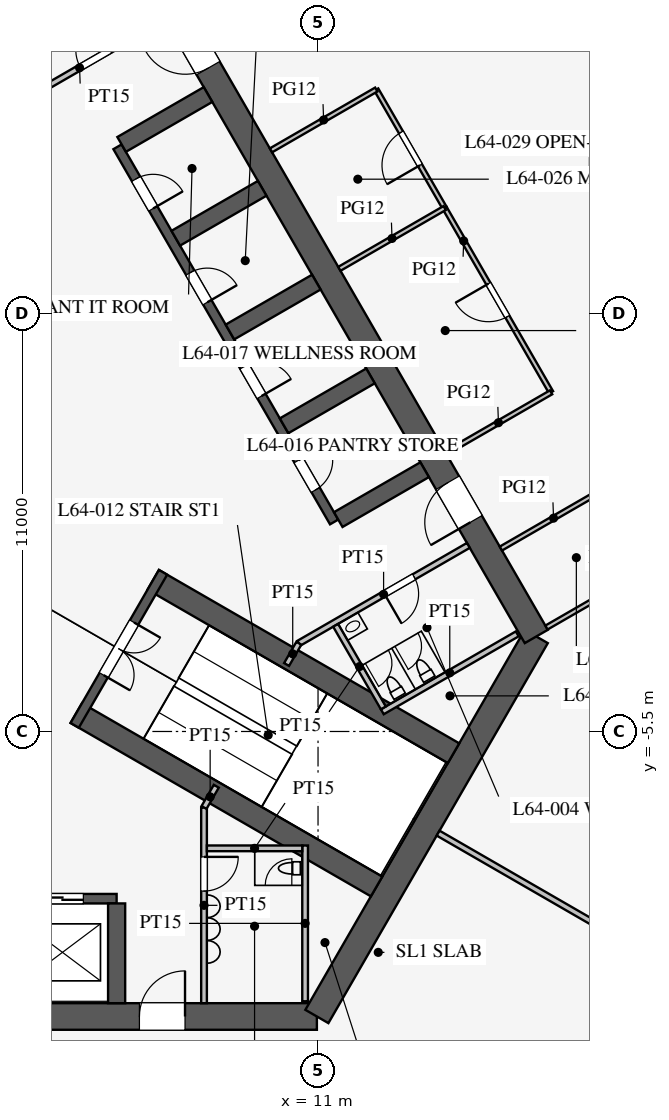
"""IFC4 building model, lengths in metres.
Left out: names, types, materials, properties, quantities, classifications, styles, units other than length and angle.
Written with IfcOpenShell. Run it as: python <this file> out.ifc"""

import sys

from ifc_helpers import new_model, si_unit, direction, frame, frame_2d, origin, place, context, subcontext, project, spatial, rectangle, extrude, element, fill, save


model = new_model("IFC4")
c1 = context("Model", 3, precision=1e-05, world=origin(), true_north=direction((0.0, 1.0)))
c2 = subcontext(c1, "Body", "Model", "MODEL_VIEW")
j1 = project(units=[si_unit("LENGTHUNIT", "METRE"), si_unit("PLANEANGLEUNIT", "RADIAN")], contexts=[c1])
p1 = place(None, origin())
s1 = spatial("IfcSite", under=j1, at=p1, CompositionType="ELEMENT")
p2 = place(p1, origin())
s2 = spatial("IfcBuilding", under=s1, at=p2, CompositionType="ELEMENT")
p3 = place(p2, frame((0.0, 0.0, 280.5)))
s3 = spatial("IfcBuildingStorey", under=s2, at=p3, CompositionType="ELEMENT", Elevation=280.5)
p4 = place(p3, frame((-10.97, -13.0, 0.0), z_axis=(0.0, 0.0, 1.0), x_axis=(1.0, 0.0, 0.0)))
e1 = element("IfcWall", 1, at=p4, inside=s3, PredefinedType="SHEAR", context=c2, shape_type="SweptSolid", body=[
    extrude(rectangle(XDim=21.939, YDim=0.7, at=frame_2d((10.97, 0.0))), origin(), (0.0, 0.0, 1.0), 4.2),
])
p5 = place(p4, frame((17.27, 0.0, 0.0)))
e2 = element("IfcOpeningElement", 2, at=p5, cuts=e1, PredefinedType="OPENING", context=c2, shape_type="SweptSolid", body=[
    extrude(rectangle(XDim=1.2, YDim=2.1, at=frame_2d((0.6, 1.05))), frame((0.0, 0.36, 0.0), z_axis=(0.0, -1.0, 0.0), x_axis=(1.0, 0.0, 0.0)), (0.0, 0.0, 1.0), 0.72),
])
p6 = place(p4, frame((3.47, 0.0, 0.0)))
e3 = element("IfcOpeningElement", 3, at=p6, cuts=e1, PredefinedType="OPENING", context=c2, shape_type="SweptSolid", body=[
    extrude(rectangle(XDim=1.2, YDim=2.1, at=frame_2d((0.6, 1.05))), frame((0.0, 0.36, 0.0), z_axis=(0.0, -1.0, 0.0), x_axis=(1.0, 0.0, 0.0)), (0.0, 0.0, 1.0), 0.72),
])
p7 = place(p3, frame((10.97, -13.0, 0.0), z_axis=(0.0, 0.0, 1.0), x_axis=(0.499995765644, 0.866027848477, 0.0)))
e4 = element("IfcWall", 4, at=p7, inside=s3, PredefinedType="SHEAR", context=c2, shape_type="SweptSolid", body=[
    extrude(rectangle(XDim=11.547, YDim=0.7, at=frame_2d((5.773, 0.0))), origin(), (0.0, 0.0, 1.0), 4.2),
])
p8 = place(p3, frame((16.743, -3.0, 0.0), z_axis=(0.0, 0.0, 1.0), x_axis=(-0.500002442456, 0.866023993627, 0.0)))
e5 = element("IfcWall", 5, at=p8, inside=s3, PredefinedType="SHEAR", context=c2, shape_type="SweptSolid", body=[
    extrude(rectangle(XDim=21.939, YDim=0.7, at=frame_2d((10.97, 0.0))), origin(), (0.0, 0.0, 1.0), 4.2),
])
p9 = place(p8, frame((17.27, 0.0, 0.0)))
e6 = element("IfcOpeningElement", 6, at=p9, cuts=e5, PredefinedType="OPENING", context=c2, shape_type="SweptSolid", body=[
    extrude(rectangle(XDim=1.2, YDim=2.1, at=frame_2d((0.6, 1.05))), frame((0.0, 0.36, 0.0), z_axis=(0.0, -1.0, 0.0), x_axis=(1.0, 0.0, 0.0)), (0.0, 0.0, 1.0), 0.72),
])
p10 = place(p8, frame((3.47, 0.0, 0.0)))
e7 = element("IfcOpeningElement", 7, at=p10, cuts=e5, PredefinedType="OPENING", context=c2, shape_type="SweptSolid", body=[
    extrude(rectangle(XDim=1.2, YDim=2.1, at=frame_2d((0.6, 1.05))), frame((0.0, 0.36, 0.0), z_axis=(0.0, -1.0, 0.0), x_axis=(1.0, 0.0, 0.0)), (0.0, 0.0, 1.0), 0.72),
])
p11 = place(p3, frame((-5.7, -9.9, 0.0), z_axis=(0.0, 0.0, 1.0), x_axis=(1.0, 0.0, 0.0)))
e8 = element("IfcWall", 8, at=p11, inside=s3, PredefinedType="SHEAR", context=c2, shape_type="SweptSolid", body=[
    extrude(rectangle(XDim=11.4, YDim=0.25, at=frame_2d((5.7, 0.0))), origin(), (0.0, 0.0, 1.0), 4.2),
])
p12 = place(p11, frame((0.875, 0.0, 0.0)))
e9 = element("IfcOpeningElement", 9, at=p12, cuts=e8, PredefinedType="OPENING", context=c2, shape_type="SweptSolid", body=[
    extrude(rectangle(XDim=1.1, YDim=2.2, at=frame_2d((0.55, 1.1))), frame((0.0, 0.135, 0.0), z_axis=(0.0, -1.0, 0.0), x_axis=(1.0, 0.0, 0.0)), (0.0, 0.0, 1.0), 0.27),
])
p13 = place(p11, frame((3.725, 0.0, 0.0)))
e10 = element("IfcOpeningElement", 10, at=p13, cuts=e8, PredefinedType="OPENING", context=c2, shape_type="SweptSolid", body=[
    extrude(rectangle(XDim=1.1, YDim=2.2, at=frame_2d((0.55, 1.1))), frame((0.0, 0.135, 0.0), z_axis=(0.0, -1.0, 0.0), x_axis=(1.0, 0.0, 0.0)), (0.0, 0.0, 1.0), 0.27),
])
p14 = place(p11, frame((6.575, 0.0, 0.0)))
e11 = element("IfcOpeningElement", 11, at=p14, cuts=e8, PredefinedType="OPENING", context=c2, shape_type="SweptSolid", body=[
    extrude(rectangle(XDim=1.1, YDim=2.2, at=frame_2d((0.55, 1.1))), frame((0.0, 0.135, 0.0), z_axis=(0.0, -1.0, 0.0), x_axis=(1.0, 0.0, 0.0)), (0.0, 0.0, 1.0), 0.27),
])
p15 = place(p11, frame((9.425, 0.0, 0.0)))
e12 = element("IfcOpeningElement", 12, at=p15, cuts=e8, PredefinedType="OPENING", context=c2, shape_type="SweptSolid", body=[
    extrude(rectangle(XDim=1.1, YDim=2.2, at=frame_2d((0.55, 1.1))), frame((0.0, 0.135, 0.0), z_axis=(0.0, -1.0, 0.0), x_axis=(1.0, 0.0, 0.0)), (0.0, 0.0, 1.0), 0.27),
])
p16 = place(p3, frame((5.7, -10.025, 0.0), z_axis=(0.0, 0.0, 1.0), x_axis=(0.0, -1.0, 0.0)))
e13 = element("IfcWall", 13, at=p16, inside=s3, PredefinedType="SHEAR", context=c2, shape_type="SweptSolid", body=[
    extrude(rectangle(XDim=2.625, YDim=0.45, at=frame_2d((1.312, 0.0))), origin(), (0.0, 0.0, 1.0), 4.2),
])
p17 = place(p3, frame((11.424, 0.014, 0.0), z_axis=(0.0, 0.0, 1.0), x_axis=(-0.500001763848, 0.866024385424, 0.0)))
e14 = element("IfcWall", 14, at=p17, inside=s3, PredefinedType="SHEAR", context=c2, shape_type="SweptSolid", body=[
    extrude(rectangle(XDim=11.4, YDim=0.25, at=frame_2d((5.7, 0.0))), origin(), (0.0, 0.0, 1.0), 4.2),
])
p18 = place(p17, frame((0.975, 0.0, 0.0)))
e15 = element("IfcOpeningElement", 15, at=p18, cuts=e14, PredefinedType="OPENING", context=c2, shape_type="SweptSolid", body=[
    extrude(rectangle(XDim=0.9, YDim=2.1, at=frame_2d((0.45, 1.05))), frame((0.0, 0.135, 0.0), z_axis=(0.0, -1.0, 0.0), x_axis=(1.0, 0.0, 0.0)), (0.0, 0.0, 1.0), 0.27),
])
p19 = place(p17, frame((3.825, 0.0, 0.0)))
e16 = element("IfcOpeningElement", 16, at=p19, cuts=e14, PredefinedType="OPENING", context=c2, shape_type="SweptSolid", body=[
    extrude(rectangle(XDim=0.9, YDim=2.1, at=frame_2d((0.45, 1.05))), frame((0.0, 0.135, 0.0), z_axis=(0.0, -1.0, 0.0), x_axis=(1.0, 0.0, 0.0)), (0.0, 0.0, 1.0), 0.27),
])
p20 = place(p17, frame((6.675, 0.0, 0.0)))
e17 = element("IfcOpeningElement", 17, at=p20, cuts=e14, PredefinedType="OPENING", context=c2, shape_type="SweptSolid", body=[
    extrude(rectangle(XDim=0.9, YDim=2.1, at=frame_2d((0.45, 1.05))), frame((0.0, 0.135, 0.0), z_axis=(0.0, -1.0, 0.0), x_axis=(1.0, 0.0, 0.0)), (0.0, 0.0, 1.0), 0.27),
])
p21 = place(p17, frame((9.525, 0.0, 0.0)))
e18 = element("IfcOpeningElement", 18, at=p21, cuts=e14, PredefinedType="OPENING", context=c2, shape_type="SweptSolid", body=[
    extrude(rectangle(XDim=0.9, YDim=2.1, at=frame_2d((0.45, 1.05))), frame((0.0, 0.135, 0.0), z_axis=(0.0, -1.0, 0.0), x_axis=(1.0, 0.0, 0.0)), (0.0, 0.0, 1.0), 0.27),
])
for number, where, z_axis, x_axis in (
    (19, (11.532, 0.076, 0.0), (0.0, 0.0, 1.0), (0.866, 0.5, 0.0)),
    (20, (10.107, 2.544, 0.0), (0.0, 0.0, 1.0), (0.866, 0.5, 0.0)),
    (21, (8.682, 5.012, 0.0), (0.0, 0.0, 1.0), (0.866, 0.5, 0.0)),
    (22, (7.257, 7.481, 0.0), (0.0, 0.0, 1.0), (0.866, 0.5, 0.0)),
    (23, (5.832, 9.949, 0.0), (0.0, 0.0, 1.0), (0.866, 0.5, 0.0)),
):
    element("IfcWall", number, at=place(p3, frame(where, z_axis=z_axis, x_axis=x_axis)), inside=s3, PredefinedType="SHEAR", context=c2, shape_type="SweptSolid", body=[
        extrude(rectangle(XDim=2.625, YDim=0.45, at=frame_2d((1.312, 0.0))), origin(), (0.0, 0.0, 1.0), 4.2),
    ])
for number, where, z_axis, x_axis in (
    (24, (4.638, -5.016, 0.0), (0.0, 0.0, 1.0), (0.866, -0.5, 0.0)),
    (25, (6.663, -1.509, 0.0), (0.0, 0.0, 1.0), (0.866, -0.5, 0.0)),
):
    element("IfcWall", number, at=place(p3, frame(where, z_axis=z_axis, x_axis=x_axis)), inside=s3, PredefinedType="SHEAR", context=c2, shape_type="SweptSolid", body=[
        extrude(rectangle(XDim=9.125, YDim=0.6, at=frame_2d((4.562, 0.0))), origin(), (0.0, 0.0, 1.0), 4.2),
    ])
p22 = place(p3, frame((4.597, -5.339, 0.0), z_axis=(0.0, 0.0, 1.0), x_axis=(0.499984536904, 0.866034331223, 0.0)))
e26 = element("IfcWall", 26, at=p22, inside=s3, PredefinedType="SHEAR", context=c2, shape_type="SweptSolid", body=[
    extrude(rectangle(XDim=4.65, YDim=0.25, at=frame_2d((2.325, 0.0))), origin(), (0.0, 0.0, 1.0), 4.2),
])
p23 = place(p22, frame((1.525, 0.0, 0.0)))
e27 = element("IfcOpeningElement", 27, at=p23, cuts=e26, PredefinedType="OPENING", context=c2, shape_type="SweptSolid", body=[
    extrude(rectangle(XDim=1.6, YDim=2.1, at=frame_2d((0.8, 1.05))), frame((0.0, 0.135, 0.0), z_axis=(0.0, -1.0, 0.0), x_axis=(1.0, 0.0, 0.0)), (0.0, 0.0, 1.0), 0.27),
])
p24 = place(p3, frame((8.0, -7.5, 0.0), z_axis=(0.0, 0.0, 1.0), x_axis=(0.0, -1.0, 0.0)))
e28 = element("IfcWall", 28, at=p24, inside=s3, PredefinedType="PARTITIONING", context=c2, shape_type="SweptSolid", body=[
    extrude(rectangle(XDim=5.15, YDim=0.15, at=frame_2d((2.575, 0.0))), origin(), (0.0, 0.0, 1.0), 4.0),
])
p25 = place(p24, frame((1.3, 0.0, 0.0)))
e29 = element("IfcOpeningElement", 29, at=p25, cuts=e28, PredefinedType="OPENING", context=c2, shape_type="SweptSolid", body=[
    extrude(rectangle(XDim=0.9, YDim=2.1, at=frame_2d((0.45, 1.05))), frame((0.0, 0.085, 0.0), z_axis=(0.0, -1.0, 0.0), x_axis=(1.0, 0.0, 0.0)), (0.0, 0.0, 1.0), 0.17),
])
p26 = place(p3, frame((2.495, 10.678, 0.0), z_axis=(0.0, 0.0, 1.0), x_axis=(0.866037967349, 0.499978238636, 0.0)))
e30 = element("IfcWall", 30, at=p26, inside=s3, PredefinedType="PARTITIONING", context=c2, shape_type="SweptSolid", body=[
    extrude(rectangle(XDim=5.15, YDim=0.15, at=frame_2d((2.575, 0.0))), origin(), (0.0, 0.0, 1.0), 4.0),
])
p27 = place(p26, frame((2.6, 0.0, 0.0)))
e31 = element("IfcOpeningElement", 31, at=p27, cuts=e30, PredefinedType="OPENING", context=c2, shape_type="SweptSolid", body=[
    extrude(rectangle(XDim=0.9, YDim=2.1, at=frame_2d((0.45, 1.05))), frame((0.0, 0.085, 0.0), z_axis=(0.0, -1.0, 0.0), x_axis=(1.0, 0.0, 0.0)), (0.0, 0.0, 1.0), 0.17),
])
p28 = place(p3, frame((10.495, -3.178, 0.0), z_axis=(0.0, 0.0, 1.0), x_axis=(0.866037967349, 0.499978238636, 0.0)))
e32 = element("IfcWall", 32, at=p28, inside=s3, PredefinedType="PARTITIONING", context=c2, shape_type="SweptSolid", body=[
    extrude(rectangle(XDim=5.15, YDim=0.15, at=frame_2d((2.575, 0.0))), origin(), (0.0, 0.0, 1.0), 4.0),
])
p29 = place(p28, frame((2.6, 0.0, 0.0)))
e33 = element("IfcOpeningElement", 33, at=p29, cuts=e32, PredefinedType="OPENING", context=c2, shape_type="SweptSolid", body=[
    extrude(rectangle(XDim=0.9, YDim=2.1, at=frame_2d((0.45, 1.05))), frame((0.0, 0.085, 0.0), z_axis=(0.0, -1.0, 0.0), x_axis=(1.0, 0.0, 0.0)), (0.0, 0.0, 1.0), 0.17),
])
for number, where, z_axis, x_axis in (
    (34, (8.0, -7.5, 0.0), (0.0, 0.0, 1.0), (0.5, 0.866, 0.0)),
    (35, (10.495, -3.178, 0.0), (0.0, 0.0, 1.0), (-0.5, -0.866, 0.0)),
):
    element("IfcWall", number, at=place(p3, frame(where, z_axis=z_axis, x_axis=x_axis)), inside=s3, PredefinedType="PARTITIONING", context=c2, shape_type="SweptSolid", body=[
        extrude(rectangle(XDim=0.645, YDim=0.15, at=frame_2d((0.323, 0.0))), origin(), (0.0, 0.0, 1.0), 4.0),
    ])
p30 = place(p3, frame((10.66, -8.5, 0.0), z_axis=(0.0, 0.0, 1.0), x_axis=(0.0, -1.0, 0.0)))
e36 = element("IfcWall", 36, at=p30, inside=s3, PredefinedType="PARTITIONING", context=c2, shape_type="SweptSolid", body=[
    extrude(rectangle(XDim=4.1, YDim=0.15, at=frame_2d((2.05, 0.0))), origin(), (0.0, 0.0, 1.0), 4.0),
])
p31 = place(p3, frame((8.075, -8.575, 0.0), z_axis=(0.0, 0.0, 1.0), x_axis=(1.0, 0.0, 0.0)))
e37 = element("IfcWall", 37, at=p31, inside=s3, PredefinedType="PARTITIONING", context=c2, shape_type="SweptSolid", body=[
    extrude(rectangle(XDim=2.51, YDim=0.15, at=frame_2d((1.255, 0.0))), origin(), (0.0, 0.0, 1.0), 4.0),
])
p32 = place(p3, frame((12.691, -4.982, 0.0), z_axis=(0.0, 0.0, 1.0), x_axis=(0.8660249478, 0.500000789788, 0.0)))
e38 = element("IfcWall", 38, at=p32, inside=s3, PredefinedType="PARTITIONING", context=c2, shape_type="SweptSolid", body=[
    extrude(rectangle(XDim=4.1, YDim=0.15, at=frame_2d((2.05, 0.0))), origin(), (0.0, 0.0, 1.0), 4.0),
])
p33 = place(p3, frame((11.464, -2.706, 0.0), z_axis=(0.0, 0.0, 1.0), x_axis=(0.50001992892, -0.866013897511, 0.0)))
e39 = element("IfcWall", 39, at=p33, inside=s3, PredefinedType="PARTITIONING", context=c2, shape_type="SweptSolid", body=[
    extrude(rectangle(XDim=2.51, YDim=0.15, at=frame_2d((1.255, 0.0))), origin(), (0.0, 0.0, 1.0), 4.0),
])
p34 = place(p3, frame((14.159, -8.175, 0.0), z_axis=(0.0, 0.0, 1.0), x_axis=(0.866026905467, -0.499997399001, 0.0)))
e40 = element("IfcWall", 40, at=p34, inside=s3, PredefinedType="PARTITIONING", context=c2, shape_type="SweptSolid", body=[
    extrude(rectangle(XDim=13.4, YDim=0.15, at=frame_2d((6.7, 0.0))), origin(), (0.0, 0.0, 1.0), 2.5),
])
p35 = place(p3, frame((14.333, 8.275, 0.0), z_axis=(0.0, 0.0, 1.0), x_axis=(-0.500012057535, 0.866018442252, 0.0)))
e41 = element("IfcWall", 41, at=p35, inside=s3, PredefinedType="PARTITIONING", context=c2, shape_type="SweptSolid", body=[
    extrude(rectangle(XDim=3.6, YDim=0.12, at=frame_2d((1.8, 0.0))), origin(), (0.0, 0.0, 1.0), 2.9),
])
p36 = place(p35, frame((1.3, 0.0, 0.15)))
e42 = element("IfcOpeningElement", 42, at=p36, cuts=e41, PredefinedType="OPENING", context=c2, shape_type="SweptSolid", body=[
    extrude(rectangle(XDim=1.0, YDim=2.1, at=frame_2d((0.5, 1.05))), frame((0.0, 0.07, 0.0), z_axis=(0.0, -1.0, 0.0), x_axis=(1.0, 0.0, 0.0)), (0.0, 0.0, 1.0), 0.14),
])
p37 = place(p3, frame((17.133, 3.425, 0.0), z_axis=(0.0, 0.0, 1.0), x_axis=(-0.500016814911, 0.866015695474, 0.0)))
e43 = element("IfcWall", 43, at=p37, inside=s3, PredefinedType="PARTITIONING", context=c2, shape_type="SweptSolid", body=[
    extrude(rectangle(XDim=5.6, YDim=0.12, at=frame_2d((2.8, 0.0))), origin(), (0.0, 0.0, 1.0), 2.9),
])
p38 = place(p37, frame((2.3, 0.0, 0.15)))
e44 = element("IfcOpeningElement", 44, at=p38, cuts=e43, PredefinedType="OPENING", context=c2, shape_type="SweptSolid", body=[
    extrude(rectangle(XDim=1.0, YDim=2.1, at=frame_2d((0.5, 1.05))), frame((0.0, 0.07, 0.0), z_axis=(0.0, -1.0, 0.0), x_axis=(1.0, 0.0, 0.0)), (0.0, 0.0, 1.0), 0.14),
])
for number, where, z_axis, x_axis in (
    (45, (9.761, 9.793, 0.0), (0.0, 0.0, 1.0), (0.866, 0.5, 0.0)),
    (46, (11.562, 6.675, 0.0), (0.0, 0.0, 1.0), (0.866, 0.5, 0.0)),
    (47, (17.011, -2.765, 0.0), (0.0, 0.0, 1.0), (0.866, 0.5, 0.0)),
):
    element("IfcWall", number, at=place(p3, frame(where, z_axis=z_axis, x_axis=x_axis)), inside=s3, PredefinedType="PARTITIONING", context=c2, shape_type="SweptSolid", body=[
        extrude(rectangle(XDim=3.2, YDim=0.12, at=frame_2d((1.6, 0.0))), origin(), (0.0, 0.0, 1.0), 2.9),
    ])
p39 = place(p3, frame((14.361, 1.825, 0.0), z_axis=(0.0, 0.0, 1.0), x_axis=(0.866028054938, 0.499995408039, 0.0)))
e48 = element("IfcWall", 48, at=p39, inside=s3, PredefinedType="PARTITIONING", context=c2, shape_type="SweptSolid", body=[
    extrude(rectangle(XDim=3.2, YDim=0.12, at=frame_2d((1.6, 0.0))), origin(), (0.0, 0.0, 1.0), 2.9),
])
p40 = place(p3, frame((15.812, -0.686, 0.0), z_axis=(0.0, 0.0, 1.0), x_axis=(0.866008981251, 0.500028443584, 0.0)))
e49 = element("IfcWall", 49, at=p40, inside=s3, PredefinedType="PARTITIONING", context=c2, shape_type="SweptSolid", body=[
    extrude(rectangle(XDim=3.2, YDim=0.12, at=frame_2d((1.6, 0.0))), origin(), (0.0, 0.0, 1.0), 2.9),
])
p41 = place(p25, origin())
e50 = element("IfcDoor", 50, at=p41, inside=s3, OperationType="SINGLE_SWING_LEFT", PredefinedType="DOOR", context=c2, shape_type="SweptSolid", body=[
    extrude(rectangle(XDim=0.9, YDim=2.1, at=frame_2d((0.45, 1.05))), frame((0.0, 0.025, 0.0), z_axis=(0.0, -1.0, 0.0), x_axis=(1.0, 0.0, 0.0)), (0.0, 0.0, 1.0), 0.05),
])
fill(e29, e50)
p42 = place(p27, origin())
e51 = element("IfcDoor", 51, at=p42, inside=s3, OperationType="SINGLE_SWING_RIGHT", PredefinedType="DOOR", context=c2, shape_type="SweptSolid", body=[
    extrude(rectangle(XDim=0.9, YDim=2.1, at=frame_2d((0.45, 1.05))), frame((0.0, 0.025, 0.0), z_axis=(0.0, -1.0, 0.0), x_axis=(1.0, 0.0, 0.0)), (0.0, 0.0, 1.0), 0.05),
])
fill(e31, e51)
p43 = place(p29, frame((0.9, 0.0, 0.0), z_axis=(0.0, 0.0, 1.0), x_axis=(-1.0, 0.0, 0.0)))
e52 = element("IfcDoor", 52, at=p43, inside=s3, OperationType="SINGLE_SWING_RIGHT", PredefinedType="DOOR", context=c2, shape_type="SweptSolid", body=[
    extrude(rectangle(XDim=0.9, YDim=2.1, at=frame_2d((0.45, 1.05))), frame((0.0, 0.025, 0.0), z_axis=(0.0, -1.0, 0.0), x_axis=(1.0, 0.0, 0.0)), (0.0, 0.0, 1.0), 0.05),
])
fill(e33, e52)
p44 = place(p23, frame((1.6, 0.0, 0.0), z_axis=(0.0, 0.0, 1.0), x_axis=(-1.0, 0.0, 0.0)))
e53 = element("IfcDoor", 53, at=p44, inside=s3, OperationType="DOUBLE_DOOR_SINGLE_SWING", PredefinedType="DOOR", context=c2, shape_type="SweptSolid", body=[
    extrude(rectangle(XDim=1.6, YDim=2.1, at=frame_2d((0.8, 1.05))), frame((0.0, 0.025, 0.0), z_axis=(0.0, -1.0, 0.0), x_axis=(1.0, 0.0, 0.0)), (0.0, 0.0, 1.0), 0.05),
])
fill(e27, e53)
p45 = place(p5, origin())
e54 = element("IfcDoor", 54, at=p45, inside=s3, OperationType="SINGLE_SWING_RIGHT", PredefinedType="DOOR", context=c2, shape_type="SweptSolid", body=[
    extrude(rectangle(XDim=1.2, YDim=2.1, at=frame_2d((0.6, 1.05))), frame((0.0, 0.025, 0.0), z_axis=(0.0, -1.0, 0.0), x_axis=(1.0, 0.0, 0.0)), (0.0, 0.0, 1.0), 0.05),
])
fill(e2, e54)
p46 = place(p9, origin())
e55 = element("IfcDoor", 55, at=p46, inside=s3, OperationType="SINGLE_SWING_RIGHT", PredefinedType="DOOR", context=c2, shape_type="SweptSolid", body=[
    extrude(rectangle(XDim=1.2, YDim=2.1, at=frame_2d((0.6, 1.05))), frame((0.0, 0.025, 0.0), z_axis=(0.0, -1.0, 0.0), x_axis=(1.0, 0.0, 0.0)), (0.0, 0.0, 1.0), 0.05),
])
fill(e6, e55)
p47 = place(p10, origin())
e56 = element("IfcDoor", 56, at=p47, inside=s3, OperationType="SINGLE_SWING_LEFT", PredefinedType="DOOR", context=c2, shape_type="SweptSolid", body=[
    extrude(rectangle(XDim=1.2, YDim=2.1, at=frame_2d((0.6, 1.05))), frame((0.0, 0.025, 0.0), z_axis=(0.0, -1.0, 0.0), x_axis=(1.0, 0.0, 0.0)), (0.0, 0.0, 1.0), 0.05),
])
fill(e7, e56)
p48 = place(p18, frame((0.9, 0.0, 0.0), z_axis=(0.0, 0.0, 1.0), x_axis=(-1.0, 0.0, 0.0)))
e57 = element("IfcDoor", 57, at=p48, inside=s3, OperationType="SINGLE_SWING_LEFT", PredefinedType="DOOR", context=c2, shape_type="SweptSolid", body=[
    extrude(rectangle(XDim=0.9, YDim=2.1, at=frame_2d((0.45, 1.05))), frame((0.0, 0.025, 0.0), z_axis=(0.0, -1.0, 0.0), x_axis=(1.0, 0.0, 0.0)), (0.0, 0.0, 1.0), 0.05),
])
fill(e15, e57)
p49 = place(p19, frame((0.9, 0.0, 0.0), z_axis=(0.0, 0.0, 1.0), x_axis=(-1.0, 0.0, 0.0)))
e58 = element("IfcDoor", 58, at=p49, inside=s3, OperationType="SINGLE_SWING_RIGHT", PredefinedType="DOOR", context=c2, shape_type="SweptSolid", body=[
    extrude(rectangle(XDim=0.9, YDim=2.1, at=frame_2d((0.45, 1.05))), frame((0.0, 0.025, 0.0), z_axis=(0.0, -1.0, 0.0), x_axis=(1.0, 0.0, 0.0)), (0.0, 0.0, 1.0), 0.05),
])
fill(e16, e58)
p50 = place(p20, frame((0.9, 0.0, 0.0), z_axis=(0.0, 0.0, 1.0), x_axis=(-1.0, 0.0, 0.0)))
e59 = element("IfcDoor", 59, at=p50, inside=s3, OperationType="SINGLE_SWING_RIGHT", PredefinedType="DOOR", context=c2, shape_type="SweptSolid", body=[
    extrude(rectangle(XDim=0.9, YDim=2.1, at=frame_2d((0.45, 1.05))), frame((0.0, 0.025, 0.0), z_axis=(0.0, -1.0, 0.0), x_axis=(1.0, 0.0, 0.0)), (0.0, 0.0, 1.0), 0.05),
])
fill(e17, e59)
p51 = place(p21, frame((0.9, 0.0, 0.0), z_axis=(0.0, 0.0, 1.0), x_axis=(-1.0, 0.0, 0.0)))
e60 = element("IfcDoor", 60, at=p51, inside=s3, OperationType="SINGLE_SWING_RIGHT", PredefinedType="DOOR", context=c2, shape_type="SweptSolid", body=[
    extrude(rectangle(XDim=0.9, YDim=2.1, at=frame_2d((0.45, 1.05))), frame((0.0, 0.025, 0.0), z_axis=(0.0, -1.0, 0.0), x_axis=(1.0, 0.0, 0.0)), (0.0, 0.0, 1.0), 0.05),
])
fill(e18, e60)
p52 = place(p38, origin())
e61 = element("IfcDoor", 61, at=p52, inside=s3, OperationType="SINGLE_SWING_RIGHT", PredefinedType="DOOR", context=c2, shape_type="SweptSolid", body=[
    extrude(rectangle(XDim=1.0, YDim=2.1, at=frame_2d((0.5, 1.05))), frame((0.0, 0.025, 0.0), z_axis=(0.0, -1.0, 0.0), x_axis=(1.0, 0.0, 0.0)), (0.0, 0.0, 1.0), 0.05),
])
fill(e44, e61)
p53 = place(p36, origin())
e62 = element("IfcDoor", 62, at=p53, inside=s3, OperationType="SINGLE_SWING_LEFT", PredefinedType="DOOR", context=c2, shape_type="SweptSolid", body=[
    extrude(rectangle(XDim=1.0, YDim=2.1, at=frame_2d((0.5, 1.05))), frame((0.0, 0.025, 0.0), z_axis=(0.0, -1.0, 0.0), x_axis=(1.0, 0.0, 0.0)), (0.0, 0.0, 1.0), 0.05),
])
fill(e42, e62)
p54 = place(p15, origin())
e63 = element("IfcDoor", 63, at=p54, inside=s3, OperationType="DOUBLE_DOOR_SLIDING", PredefinedType="DOOR", context=c2, shape_type="SweptSolid", body=[
    extrude(rectangle(XDim=1.1, YDim=2.2, at=frame_2d((0.55, 1.1))), frame((0.0, 0.025, 0.0), z_axis=(0.0, -1.0, 0.0), x_axis=(1.0, 0.0, 0.0)), (0.0, 0.0, 1.0), 0.05),
])
fill(e12, e63)
save(model, sys.argv[1])
